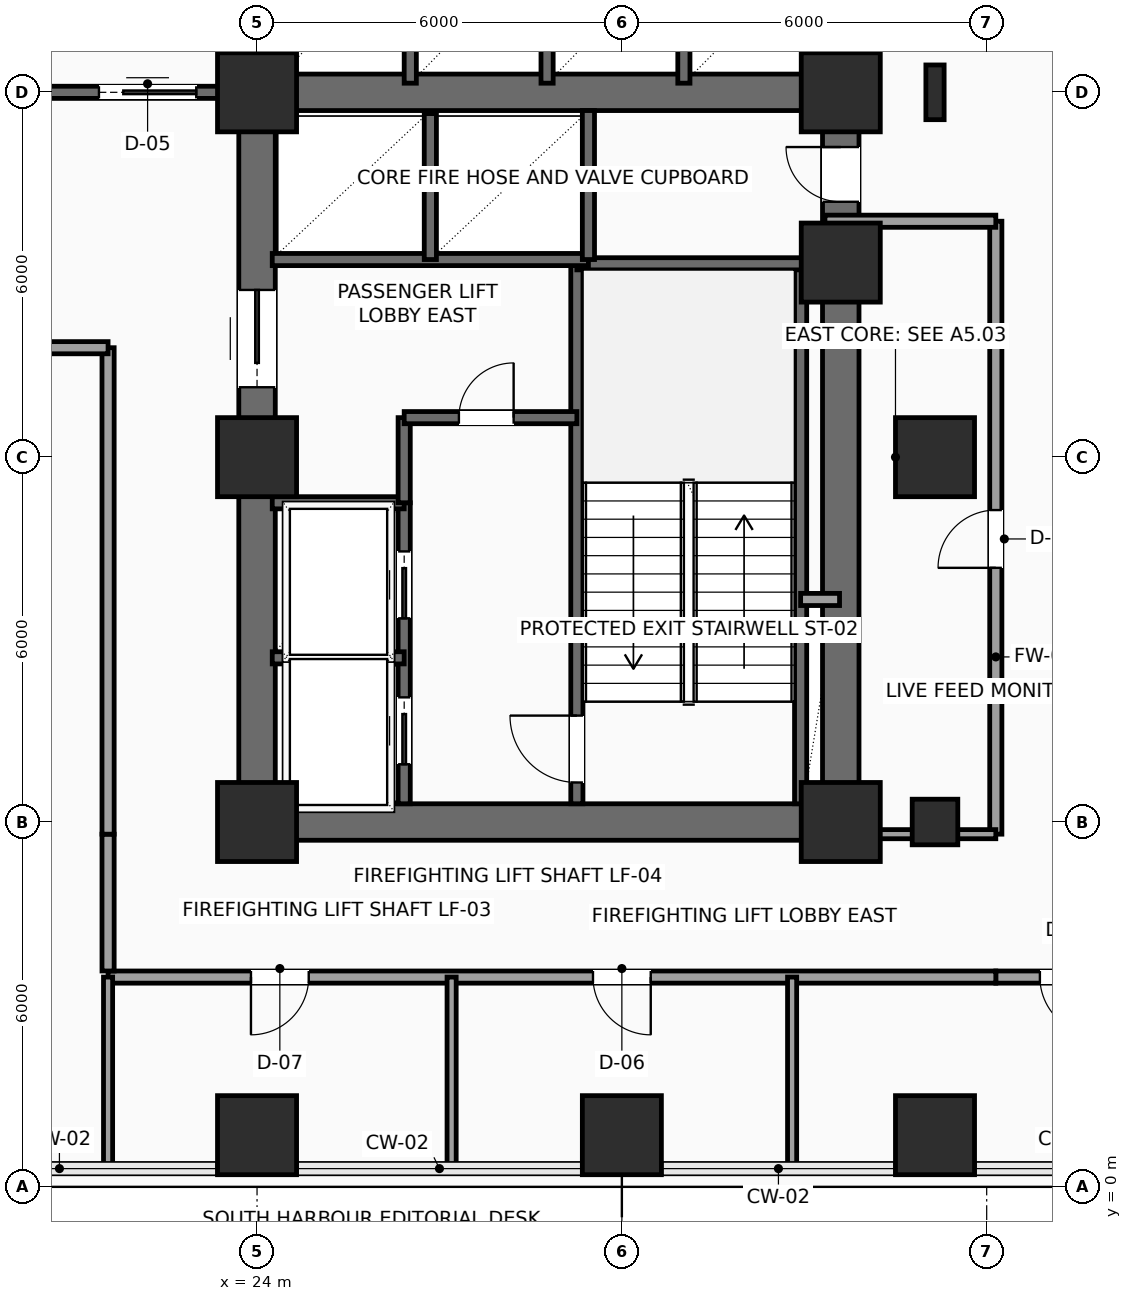
"""IFC4 building model, lengths in metres.
Left out: names, types, materials, properties, quantities, classifications, styles, units other than length and angle.
Written with IfcOpenShell. Run it as: python <this file> out.ifc"""

import sys

from ifc_helpers import new_model, si_unit, direction, frame, frame_2d, origin, origin_2d, place, context, subcontext, project, spatial, rectangle, hollow_rectangle, i_section, extrude, element, fill, save


model = new_model("IFC4")
c1 = context("Model", 3, precision=1e-05, world=origin(), true_north=direction((0.0, 1.0)))
c2 = subcontext(c1, "Body", "Model", "MODEL_VIEW")
j1 = project(units=[si_unit("LENGTHUNIT", "METRE"), si_unit("PLANEANGLEUNIT", "RADIAN")], contexts=[c1])
p1 = place(None, origin())
s1 = spatial("IfcSite", under=j1, at=p1, CompositionType="ELEMENT")
p2 = place(p1, origin())
s2 = spatial("IfcBuilding", under=s1, at=p2, CompositionType="ELEMENT")
p3 = place(p2, frame((0.0, 0.0, 55.8)))
s3 = spatial("IfcBuildingStorey", under=s2, at=p3, CompositionType="ELEMENT", Elevation=55.8)
for number, where, z_axis, x_axis in (
    (1, (24.0, 6.0, 0.0), (0.0, 0.0, 1.0), (1.0, 0.0, 0.0)),
    (2, (24.0, 12.0, 0.0), (0.0, 0.0, 1.0), (1.0, 0.0, 0.0)),
    (3, (24.0, 18.0, 0.0), (0.0, 0.0, 1.0), (1.0, 0.0, 0.0)),
    (4, (33.6, 6.0, 0.0), (0.0, 0.0, 1.0), (1.0, 0.0, 0.0)),
    (5, (33.6, 15.2, 0.0), (0.0, 0.0, 1.0), (1.0, 0.0, 0.0)),
    (6, (33.6, 18.0, 0.0), (0.0, 0.0, 1.0), (1.0, 0.0, 0.0)),
    (7, (24.0, 0.85, 0.0), (0.0, 0.0, 1.0), (1.0, 0.0, 0.0)),
    (8, (30.0, 0.85, 0.0), (0.0, 0.0, 1.0), (1.0, 0.0, 0.0)),
    (9, (35.15, 0.85, 0.0), (0.0, 0.0, 1.0), (1.0, 0.0, 0.0)),
):
    element("IfcColumn", number, at=place(p3, frame(where, z_axis=z_axis, x_axis=x_axis)), inside=s3, PredefinedType="COLUMN", context=c2, shape_type="SweptSolid", body=[
        extrude(rectangle(XDim=1.3, YDim=1.3, at=origin_2d()), origin(), (0.0, 0.0, 1.0), 3.9),
    ])
p4 = place(p3, frame((35.15, 6.0, 0.0), z_axis=(0.0, 0.0, 1.0), x_axis=(1.0, 0.0, 0.0)))
e10 = element("IfcColumn", 10, at=p4, inside=s3, PredefinedType="COLUMN", context=c2, shape_type="SweptSolid", body=[
    extrude(hollow_rectangle(XDim=0.75, YDim=0.75, WallThickness=0.035, InnerFilletRadius=0.035, OuterFilletRadius=0.05, at=origin_2d()), origin(), (0.0, 0.0, 1.0), 3.9),
])
p5 = place(p3, frame((35.15, 12.0, 0.0), z_axis=(0.0, 0.0, 1.0), x_axis=(1.0, 0.0, 0.0)))
e11 = element("IfcColumn", 11, at=p5, inside=s3, PredefinedType="COLUMN", context=c2, shape_type="SweptSolid", body=[
    extrude(rectangle(XDim=1.3, YDim=1.3, at=origin_2d()), origin(), (0.0, 0.0, 1.0), 3.9),
])
p6 = place(p3, frame((35.15, 18.0, 0.0), z_axis=(0.0, 0.0, 1.0), x_axis=(1.0, 0.0, 0.0)))
e12 = element("IfcColumn", 12, at=p6, inside=s3, PredefinedType="COLUMN", context=c2, shape_type="SweptSolid", body=[
    extrude(i_section(OverallWidth=0.3, OverallDepth=0.9, WebThickness=0.019, FlangeThickness=0.035, FilletRadius=0.03, at=origin_2d()), origin(), (0.0, 0.0, 1.0), 3.9),
])
for number, where, z_axis, x_axis in (
    (13, (24.0, 6.0, 0.0), (0.0, 0.0, 1.0), (1.0, 0.0, 0.0)),
    (14, (24.0, 18.0, 0.0), (0.0, 0.0, 1.0), (1.0, 0.0, 0.0)),
):
    element("IfcWall", number, at=place(p3, frame(where, z_axis=z_axis, x_axis=x_axis)), inside=s3, PredefinedType="SHEAR", context=c2, shape_type="SweptSolid", body=[
        extrude(rectangle(XDim=9.6, YDim=0.6, at=frame_2d((4.8, 0.0))), origin(), (0.0, 0.0, 1.0), 3.65),
    ])
p7 = place(p3, frame((24.0, 6.0, 0.0), z_axis=(0.0, 0.0, 1.0), x_axis=(0.0, 1.0, 0.0)))
e15 = element("IfcWall", 15, at=p7, inside=s3, PredefinedType="SHEAR", context=c2, shape_type="SweptSolid", body=[
    extrude(rectangle(XDim=12.0, YDim=0.6, at=frame_2d((6.0, 0.0))), origin(), (0.0, 0.0, 1.0), 3.65),
])
p8 = place(p7, frame((7.15, 0.0, 0.0)))
e16 = element("IfcOpeningElement", 16, at=p8, cuts=e15, PredefinedType="OPENING", context=c2, shape_type="SweptSolid", body=[
    extrude(rectangle(XDim=1.6, YDim=2.3, at=frame_2d((0.8, 1.15))), frame((0.0, 0.31, 0.0), z_axis=(0.0, -1.0, 0.0), x_axis=(1.0, 0.0, 0.0)), (0.0, 0.0, 1.0), 0.62),
])
p9 = place(p3, frame((33.6, 6.0, 0.0), z_axis=(0.0, 0.0, 1.0), x_axis=(0.0, 1.0, 0.0)))
e17 = element("IfcWall", 17, at=p9, inside=s3, PredefinedType="SHEAR", context=c2, shape_type="SweptSolid", body=[
    extrude(rectangle(XDim=12.0, YDim=0.6, at=frame_2d((6.0, 0.0))), origin(), (0.0, 0.0, 1.0), 3.65),
])
p10 = place(p9, frame((10.2, 0.0, 0.0)))
e18 = element("IfcOpeningElement", 18, at=p10, cuts=e17, PredefinedType="OPENING", context=c2, shape_type="SweptSolid", body=[
    extrude(rectangle(XDim=0.9, YDim=2.15, at=frame_2d((0.45, 1.075))), frame((0.0, 0.31, 0.0), z_axis=(0.0, -1.0, 0.0), x_axis=(1.0, 0.0, 0.0)), (0.0, 0.0, 1.0), 0.62),
])
p11 = place(p3, frame((29.26, 6.3, 0.0), z_axis=(0.0, 0.0, 1.0), x_axis=(0.0, 1.0, 0.0)))
e19 = element("IfcWall", 19, at=p11, inside=s3, PredefinedType="SHEAR", context=c2, shape_type="SweptSolid", body=[
    extrude(rectangle(XDim=8.88, YDim=0.2, at=frame_2d((4.44, 0.0))), origin(), (0.0, 0.0, 1.0), 3.65),
])
p12 = place(p11, frame((0.35, 0.0, 0.0)))
e20 = element("IfcOpeningElement", 20, at=p12, cuts=e19, PredefinedType="OPENING", context=c2, shape_type="SweptSolid", body=[
    extrude(rectangle(XDim=1.1, YDim=2.2, at=frame_2d((0.55, 1.1))), frame((0.0, 0.11, 0.0), z_axis=(0.0, -1.0, 0.0), x_axis=(1.0, 0.0, 0.0)), (0.0, 0.0, 1.0), 0.22),
])
p13 = place(p3, frame((32.94, 6.3, 0.0), z_axis=(0.0, 0.0, 1.0), x_axis=(0.0, 1.0, 0.0)))
e21 = element("IfcWall", 21, at=p13, inside=s3, PredefinedType="SHEAR", context=c2, shape_type="SweptSolid", body=[
    extrude(rectangle(XDim=8.88, YDim=0.2, at=frame_2d((4.44, 0.0))), origin(), (0.0, 0.0, 1.0), 3.65),
])
p14 = place(p3, frame((29.26, 15.18, 0.0), z_axis=(0.0, 0.0, 1.0), x_axis=(1.0, 0.0, 0.0)))
e22 = element("IfcWall", 22, at=p14, inside=s3, PredefinedType="SHEAR", context=c2, shape_type="SweptSolid", body=[
    extrude(rectangle(XDim=4.04, YDim=0.2, at=frame_2d((2.02, 0.0))), origin(), (0.0, 0.0, 1.0), 3.65),
])
p15 = place(p3, frame((26.42, 6.3, 0.0), z_axis=(0.0, 0.0, 1.0), x_axis=(0.0, 1.0, 0.0)))
e23 = element("IfcWall", 23, at=p15, inside=s3, PredefinedType="SHEAR", context=c2, shape_type="SweptSolid", body=[
    extrude(rectangle(XDim=4.95, YDim=0.2, at=frame_2d((2.475, 0.0))), origin(), (0.0, 0.0, 1.0), 3.65),
])
p16 = place(p15, frame((0.65, 0.0, 0.0)))
e24 = element("IfcOpeningElement", 24, at=p16, cuts=e23, PredefinedType="OPENING", context=c2, shape_type="SweptSolid", body=[
    extrude(rectangle(XDim=1.1, YDim=2.2, at=frame_2d((0.55, 1.1))), frame((0.0, 0.11, 0.0), z_axis=(0.0, -1.0, 0.0), x_axis=(1.0, 0.0, 0.0)), (0.0, 0.0, 1.0), 0.22),
])
p17 = place(p15, frame((3.05, 0.0, 0.0)))
e25 = element("IfcOpeningElement", 25, at=p17, cuts=e23, PredefinedType="OPENING", context=c2, shape_type="SweptSolid", body=[
    extrude(rectangle(XDim=1.1, YDim=2.2, at=frame_2d((0.55, 1.1))), frame((0.0, 0.11, 0.0), z_axis=(0.0, -1.0, 0.0), x_axis=(1.0, 0.0, 0.0)), (0.0, 0.0, 1.0), 0.22),
])
for number, where, z_axis, x_axis in (
    (26, (24.25, 8.7, 0.0), (0.0, 0.0, 1.0), (1.0, 0.0, 0.0)),
    (27, (24.25, 11.25, 0.0), (0.0, 0.0, 1.0), (1.0, 0.0, 0.0)),
):
    element("IfcWall", number, at=place(p3, frame(where, z_axis=z_axis, x_axis=x_axis)), inside=s3, PredefinedType="SHEAR", context=c2, shape_type="SweptSolid", body=[
        extrude(rectangle(XDim=2.17, YDim=0.2, at=frame_2d((1.085, 0.0))), origin(), (0.0, 0.0, 1.0), 3.65),
    ])
p18 = place(p3, frame((26.42, 11.25, 0.0), z_axis=(0.0, 0.0, 1.0), x_axis=(0.0, 1.0, 0.0)))
e28 = element("IfcWall", 28, at=p18, inside=s3, PredefinedType="SHEAR", context=c2, shape_type="SweptSolid", body=[
    extrude(rectangle(XDim=1.4, YDim=0.2, at=frame_2d((0.7, 0.0))), origin(), (0.0, 0.0, 1.0), 3.65),
])
p19 = place(p3, frame((26.42, 12.65, 0.0), z_axis=(0.0, 0.0, 1.0), x_axis=(1.0, 0.0, 0.0)))
e29 = element("IfcWall", 29, at=p19, inside=s3, PredefinedType="SHEAR", context=c2, shape_type="SweptSolid", body=[
    extrude(rectangle(XDim=2.84, YDim=0.2, at=frame_2d((1.42, 0.0))), origin(), (0.0, 0.0, 1.0), 3.65),
])
p20 = place(p19, frame((0.9, 0.0, 0.0)))
e30 = element("IfcOpeningElement", 30, at=p20, cuts=e29, PredefinedType="OPENING", context=c2, shape_type="SweptSolid", body=[
    extrude(rectangle(XDim=0.9, YDim=2.15, at=frame_2d((0.45, 1.075))), frame((0.0, 0.11, 0.0), z_axis=(0.0, -1.0, 0.0), x_axis=(1.0, 0.0, 0.0)), (0.0, 0.0, 1.0), 0.22),
])
p21 = place(p3, frame((32.94, 9.66, 0.0), z_axis=(0.0, 0.0, 1.0), x_axis=(1.0, 0.0, 0.0)))
e31 = element("IfcWall", 31, at=p21, inside=s3, PredefinedType="SOLIDWALL", context=c2, shape_type="SweptSolid", body=[
    extrude(rectangle(XDim=0.64, YDim=0.2, at=frame_2d((0.32, 0.0))), origin(), (0.0, 0.0, 1.0), 3.65),
])
p22 = place(p3, frame((24.25, 15.25, 0.0), z_axis=(0.0, 0.0, 1.0), x_axis=(1.0, 0.0, 0.0)))
e32 = element("IfcWall", 32, at=p22, inside=s3, PredefinedType="SHEAR", context=c2, shape_type="SweptSolid", body=[
    extrude(rectangle(XDim=5.2, YDim=0.2, at=frame_2d((2.6, 0.0))), origin(), (0.0, 0.0, 1.0), 3.65),
])
p23 = place(p3, frame((26.85, 15.25, 0.0), z_axis=(0.0, 0.0, 1.0), x_axis=(0.0, 1.0, 0.0)))
e33 = element("IfcWall", 33, at=p23, inside=s3, PredefinedType="SHEAR", context=c2, shape_type="SweptSolid", body=[
    extrude(rectangle(XDim=2.4, YDim=0.2, at=frame_2d((1.2, 0.0))), origin(), (0.0, 0.0, 1.0), 3.65),
])
p24 = place(p3, frame((29.45, 15.25, 0.0), z_axis=(0.0, 0.0, 1.0), x_axis=(0.0, 1.0, 0.0)))
e34 = element("IfcWall", 34, at=p24, inside=s3, PredefinedType="SHEAR", context=c2, shape_type="SweptSolid", body=[
    extrude(rectangle(XDim=2.45, YDim=0.2, at=frame_2d((1.225, 0.0))), origin(), (0.0, 0.0, 1.0), 3.65),
])
p25 = place(p3, frame((20.45, 18.0, 0.0), z_axis=(0.0, 0.0, 1.0), x_axis=(1.0, 0.0, 0.0)))
e35 = element("IfcWall", 35, at=p25, inside=s3, PredefinedType="SHEAR", context=c2, shape_type="SweptSolid", body=[
    extrude(rectangle(XDim=3.5, YDim=0.2, at=frame_2d((1.75, 0.0))), origin(), (0.0, 0.0, 1.0), 3.65),
])
p26 = place(p25, frame((0.95, 0.0, 0.0)))
e36 = element("IfcOpeningElement", 36, at=p26, cuts=e35, PredefinedType="OPENING", context=c2, shape_type="SweptSolid", body=[
    extrude(rectangle(XDim=1.6, YDim=2.3, at=frame_2d((0.8, 1.15))), frame((0.0, 0.11, 0.0), z_axis=(0.0, -1.0, 0.0), x_axis=(1.0, 0.0, 0.0)), (0.0, 0.0, 1.0), 0.22),
])
p27 = place(p3, frame((23.95, 18.0, 0.0), z_axis=(0.0, 0.0, 1.0), x_axis=(0.0, 1.0, 0.0)))
e37 = element("IfcWall", 37, at=p27, inside=s3, PredefinedType="SHEAR", context=c2, shape_type="SweptSolid", body=[
    extrude(rectangle(XDim=9.3, YDim=0.2, at=frame_2d((4.65, 0.0))), origin(), (0.0, 0.0, 1.0), 3.65),
])
for number, where, z_axis, x_axis in (
    (38, (33.3, 18.1, 0.0), (0.0, 0.0, 1.0), (0.0, 1.0, 0.0)),
    (39, (24.25, 18.1, 0.0), (0.0, 0.0, 1.0), (0.0, 1.0, 0.0)),
):
    element("IfcWall", number, at=place(p3, frame(where, z_axis=z_axis, x_axis=x_axis)), inside=s3, PredefinedType="SHEAR", context=c2, shape_type="SweptSolid", body=[
        extrude(rectangle(XDim=2.35, YDim=0.2, at=frame_2d((1.175, 0.0))), origin(), (0.0, 0.0, 1.0), 3.65),
    ])
for number, where, z_axis, x_axis in (
    (40, (26.52, 18.15, 0.0), (0.0, 0.0, 1.0), (0.0, 1.0, 0.0)),
    (41, (28.77, 18.15, 0.0), (0.0, 0.0, 1.0), (0.0, 1.0, 0.0)),
    (42, (31.02, 18.15, 0.0), (0.0, 0.0, 1.0), (0.0, 1.0, 0.0)),
):
    element("IfcWall", number, at=place(p3, frame(where, z_axis=z_axis, x_axis=x_axis)), inside=s3, PredefinedType="SHEAR", context=c2, shape_type="SweptSolid", body=[
        extrude(rectangle(XDim=2.3, YDim=0.2, at=frame_2d((1.15, 0.0))), origin(), (0.0, 0.0, 1.0), 3.65),
    ])
p28 = place(p3, frame((36.15, 5.8, 0.0), z_axis=(0.0, 0.0, 1.0), x_axis=(0.0, 1.0, 0.0)))
e43 = element("IfcWall", 43, at=p28, inside=s3, PredefinedType="SOLIDWALL", context=c2, shape_type="SweptSolid", body=[
    extrude(rectangle(XDim=10.08, YDim=0.2, at=frame_2d((5.04, 0.0))), origin(), (0.0, 0.0, 1.0), 3.65),
])
p29 = place(p28, frame((4.38, 0.0, 0.0)))
e44 = element("IfcOpeningElement", 44, at=p29, cuts=e43, PredefinedType="OPENING", context=c2, shape_type="SweptSolid", body=[
    extrude(rectangle(XDim=0.95, YDim=2.15, at=frame_2d((0.475, 1.075))), frame((0.0, 0.11, 0.0), z_axis=(0.0, -1.0, 0.0), x_axis=(1.0, 0.0, 0.0)), (0.0, 0.0, 1.0), 0.22),
])
p30 = place(p3, frame((36.15, 15.88, 0.0), z_axis=(0.0, 0.0, 1.0), x_axis=(-1.0, 0.0, 0.0)))
e45 = element("IfcWall", 45, at=p30, inside=s3, PredefinedType="SOLIDWALL", context=c2, shape_type="SweptSolid", body=[
    extrude(rectangle(XDim=2.81, YDim=0.2, at=frame_2d((1.405, 0.0))), origin(), (0.0, 0.0, 1.0), 3.65),
])
p31 = place(p3, frame((38.55, 3.45, 0.0), z_axis=(0.0, 0.0, 1.0), x_axis=(-1.0, 0.0, 0.0)))
e46 = element("IfcWall", 46, at=p31, inside=s3, PredefinedType="SOLIDWALL", context=c2, shape_type="SweptSolid", body=[
    extrude(rectangle(XDim=2.4, YDim=0.2, at=frame_2d((1.2, 0.0))), origin(), (0.0, 0.0, 1.0), 3.142),
])
p32 = place(p31, frame((0.725, 0.0, 0.0)))
e47 = element("IfcOpeningElement", 47, at=p32, cuts=e46, PredefinedType="OPENING", context=c2, shape_type="SweptSolid", body=[
    extrude(rectangle(XDim=0.95, YDim=2.15, at=frame_2d((0.475, 1.075))), frame((0.0, 0.11, 0.0), z_axis=(0.0, -1.0, 0.0), x_axis=(1.0, 0.0, 0.0)), (0.0, 0.0, 1.0), 0.22),
])
p33 = place(p3, frame((36.15, 3.45, 0.0), z_axis=(0.0, 0.0, 1.0), x_axis=(-1.0, 0.0, 0.0)))
e48 = element("IfcWall", 48, at=p33, inside=s3, PredefinedType="SOLIDWALL", context=c2, shape_type="SweptSolid", body=[
    extrude(rectangle(XDim=14.6, YDim=0.2, at=frame_2d((7.3, 0.0))), origin(), (0.0, 0.0, 1.0), 3.142),
])
p34 = place(p33, frame((11.3, 0.0, 0.0)))
e49 = element("IfcOpeningElement", 49, at=p34, cuts=e48, PredefinedType="OPENING", context=c2, shape_type="SweptSolid", body=[
    extrude(rectangle(XDim=0.95, YDim=2.15, at=frame_2d((0.475, 1.075))), frame((0.0, 0.11, 0.0), z_axis=(0.0, -1.0, 0.0), x_axis=(1.0, 0.0, 0.0)), (0.0, 0.0, 1.0), 0.22),
])
p35 = place(p33, frame((5.675, 0.0, 0.0)))
e50 = element("IfcOpeningElement", 50, at=p35, cuts=e48, PredefinedType="OPENING", context=c2, shape_type="SweptSolid", body=[
    extrude(rectangle(XDim=0.95, YDim=2.15, at=frame_2d((0.475, 1.075))), frame((0.0, 0.11, 0.0), z_axis=(0.0, -1.0, 0.0), x_axis=(1.0, 0.0, 0.0)), (0.0, 0.0, 1.0), 0.22),
])
p36 = place(p3, frame((21.55, 3.55, 0.0), z_axis=(0.0, 0.0, 1.0), x_axis=(0.0, 1.0, 0.0)))
e51 = element("IfcWall", 51, at=p36, inside=s3, PredefinedType="SOLIDWALL", context=c2, shape_type="SweptSolid", body=[
    extrude(rectangle(XDim=2.25, YDim=0.2, at=frame_2d((1.125, 0.0))), origin(), (0.0, 0.0, 1.0), 3.65),
])
p37 = place(p3, frame((21.55, 5.8, 0.0), z_axis=(0.0, 0.0, 1.0), x_axis=(0.0, 1.0, 0.0)))
e52 = element("IfcWall", 52, at=p37, inside=s3, PredefinedType="SOLIDWALL", context=c2, shape_type="SweptSolid", body=[
    extrude(rectangle(XDim=8.0, YDim=0.2, at=frame_2d((4.0, 0.0))), origin(), (0.0, 0.0, 1.0), 3.65),
])
p38 = place(p3, frame((21.55, 13.8, 0.0), z_axis=(0.0, 0.0, 1.0), x_axis=(-1.0, 0.0, 0.0)))
e53 = element("IfcWall", 53, at=p38, inside=s3, PredefinedType="SOLIDWALL", context=c2, shape_type="SweptSolid", body=[
    extrude(rectangle(XDim=8.95, YDim=0.2, at=frame_2d((4.475, 0.0))), origin(), (0.0, 0.0, 1.0), 3.65),
])
p39 = place(p38, frame((6.875, 0.0, 0.0)))
e54 = element("IfcOpeningElement", 54, at=p39, cuts=e53, PredefinedType="OPENING", context=c2, shape_type="SweptSolid", body=[
    extrude(rectangle(XDim=0.95, YDim=2.15, at=frame_2d((0.475, 1.075))), frame((0.0, 0.11, 0.0), z_axis=(0.0, -1.0, 0.0), x_axis=(1.0, 0.0, 0.0)), (0.0, 0.0, 1.0), 0.22),
])
p40 = place(p38, frame((1.93, 0.0, 0.0)))
e55 = element("IfcOpeningElement", 55, at=p40, cuts=e53, PredefinedType="OPENING", context=c2, shape_type="SweptSolid", body=[
    extrude(rectangle(XDim=0.95, YDim=2.15, at=frame_2d((0.475, 1.075))), frame((0.0, 0.11, 0.0), z_axis=(0.0, -1.0, 0.0), x_axis=(1.0, 0.0, 0.0)), (0.0, 0.0, 1.0), 0.22),
])
for number, where, z_axis, x_axis in (
    (56, (21.55, 0.3, 0.0), (0.0, 0.0, 1.0), (0.0, 1.0, 0.0)),
    (57, (27.2, 0.3, 0.0), (0.0, 0.0, 1.0), (0.0, 1.0, 0.0)),
    (58, (32.8, 0.3, 0.0), (0.0, 0.0, 1.0), (0.0, 1.0, 0.0)),
):
    element("IfcWall", number, at=place(p3, frame(where, z_axis=z_axis, x_axis=x_axis)), inside=s3, PredefinedType="PARTITIONING", context=c2, shape_type="SweptSolid", body=[
        extrude(rectangle(XDim=3.15, YDim=0.15, at=frame_2d((1.575, 0.0))), origin(), (0.0, 0.0, 1.0), 3.65),
    ])
p41 = place(p3, frame((33.65, 5.8, 0.0), z_axis=(0.0, 0.0, 1.0), x_axis=(1.0, 0.0, 0.0)))
e59 = element("IfcWall", 59, at=p41, inside=s3, PredefinedType="PARTITIONING", context=c2, shape_type="SweptSolid", body=[
    extrude(rectangle(XDim=2.5, YDim=0.15, at=frame_2d((1.25, 0.0))), origin(), (0.0, 0.0, 1.0), 2.992),
])
p42 = place(p8, origin())
e60 = element("IfcDoor", 60, at=p42, inside=s3, OperationType="DOUBLE_DOOR_SLIDING", PredefinedType="DOOR", context=c2, shape_type="SweptSolid", body=[
    extrude(rectangle(XDim=1.6, YDim=2.3, at=frame_2d((0.8, 1.15))), frame((0.0, 0.025, 0.0), z_axis=(0.0, -1.0, 0.0), x_axis=(1.0, 0.0, 0.0)), (0.0, 0.0, 1.0), 0.05),
])
fill(e16, e60)
p43 = place(p10, origin())
e61 = element("IfcDoor", 61, at=p43, inside=s3, OperationType="SINGLE_SWING_RIGHT", PredefinedType="DOOR", context=c2, shape_type="SweptSolid", body=[
    extrude(rectangle(XDim=0.9, YDim=2.15, at=frame_2d((0.45, 1.075))), frame((0.0, 0.025, 0.0), z_axis=(0.0, -1.0, 0.0), x_axis=(1.0, 0.0, 0.0)), (0.0, 0.0, 1.0), 0.05),
])
fill(e18, e61)
p44 = place(p12, origin())
e62 = element("IfcDoor", 62, at=p44, inside=s3, OperationType="SINGLE_SWING_RIGHT", PredefinedType="DOOR", context=c2, shape_type="SweptSolid", body=[
    extrude(rectangle(XDim=1.1, YDim=2.2, at=frame_2d((0.55, 1.1))), frame((0.0, 0.025, 0.0), z_axis=(0.0, -1.0, 0.0), x_axis=(1.0, 0.0, 0.0)), (0.0, 0.0, 1.0), 0.05),
])
fill(e20, e62)
p45 = place(p16, origin())
e63 = element("IfcDoor", 63, at=p45, inside=s3, OperationType="SLIDING_TO_LEFT", PredefinedType="DOOR", context=c2, shape_type="SweptSolid", body=[
    extrude(rectangle(XDim=1.1, YDim=2.2, at=frame_2d((0.55, 1.1))), frame((0.0, 0.025, 0.0), z_axis=(0.0, -1.0, 0.0), x_axis=(1.0, 0.0, 0.0)), (0.0, 0.0, 1.0), 0.05),
])
fill(e24, e63)
p46 = place(p17, origin())
e64 = element("IfcDoor", 64, at=p46, inside=s3, OperationType="SLIDING_TO_LEFT", PredefinedType="DOOR", context=c2, shape_type="SweptSolid", body=[
    extrude(rectangle(XDim=1.1, YDim=2.2, at=frame_2d((0.55, 1.1))), frame((0.0, 0.025, 0.0), z_axis=(0.0, -1.0, 0.0), x_axis=(1.0, 0.0, 0.0)), (0.0, 0.0, 1.0), 0.05),
])
fill(e25, e64)
p47 = place(p20, origin())
e65 = element("IfcDoor", 65, at=p47, inside=s3, OperationType="SINGLE_SWING_RIGHT", PredefinedType="DOOR", context=c2, shape_type="SweptSolid", body=[
    extrude(rectangle(XDim=0.9, YDim=2.15, at=frame_2d((0.45, 1.075))), frame((0.0, 0.025, 0.0), z_axis=(0.0, -1.0, 0.0), x_axis=(1.0, 0.0, 0.0)), (0.0, 0.0, 1.0), 0.05),
])
fill(e30, e65)
p48 = place(p26, origin())
e66 = element("IfcDoor", 66, at=p48, inside=s3, OperationType="DOUBLE_DOOR_SLIDING", PredefinedType="DOOR", context=c2, shape_type="SweptSolid", body=[
    extrude(rectangle(XDim=1.6, YDim=2.3, at=frame_2d((0.8, 1.15))), frame((0.0, 0.025, 0.0), z_axis=(0.0, -1.0, 0.0), x_axis=(1.0, 0.0, 0.0)), (0.0, 0.0, 1.0), 0.05),
])
fill(e36, e66)
p49 = place(p29, origin())
e67 = element("IfcDoor", 67, at=p49, inside=s3, OperationType="SINGLE_SWING_LEFT", PredefinedType="DOOR", context=c2, shape_type="SweptSolid", body=[
    extrude(rectangle(XDim=0.95, YDim=2.15, at=frame_2d((0.475, 1.075))), frame((0.0, 0.025, 0.0), z_axis=(0.0, -1.0, 0.0), x_axis=(1.0, 0.0, 0.0)), (0.0, 0.0, 1.0), 0.05),
])
fill(e44, e67)
p50 = place(p32, origin())
e68 = element("IfcDoor", 68, at=p50, inside=s3, OperationType="SINGLE_SWING_LEFT", PredefinedType="DOOR", context=c2, shape_type="SweptSolid", body=[
    extrude(rectangle(XDim=0.95, YDim=2.15, at=frame_2d((0.475, 1.075))), frame((0.0, 0.025, 0.0), z_axis=(0.0, -1.0, 0.0), x_axis=(1.0, 0.0, 0.0)), (0.0, 0.0, 1.0), 0.05),
])
fill(e47, e68)
p51 = place(p34, origin())
e69 = element("IfcDoor", 69, at=p51, inside=s3, OperationType="SINGLE_SWING_RIGHT", PredefinedType="DOOR", context=c2, shape_type="SweptSolid", body=[
    extrude(rectangle(XDim=0.95, YDim=2.15, at=frame_2d((0.475, 1.075))), frame((0.0, 0.025, 0.0), z_axis=(0.0, -1.0, 0.0), x_axis=(1.0, 0.0, 0.0)), (0.0, 0.0, 1.0), 0.05),
])
fill(e49, e69)
p52 = place(p35, origin())
e70 = element("IfcDoor", 70, at=p52, inside=s3, OperationType="SINGLE_SWING_LEFT", PredefinedType="DOOR", context=c2, shape_type="SweptSolid", body=[
    extrude(rectangle(XDim=0.95, YDim=2.15, at=frame_2d((0.475, 1.075))), frame((0.0, 0.025, 0.0), z_axis=(0.0, -1.0, 0.0), x_axis=(1.0, 0.0, 0.0)), (0.0, 0.0, 1.0), 0.05),
])
fill(e50, e70)
save(model, sys.argv[1])
